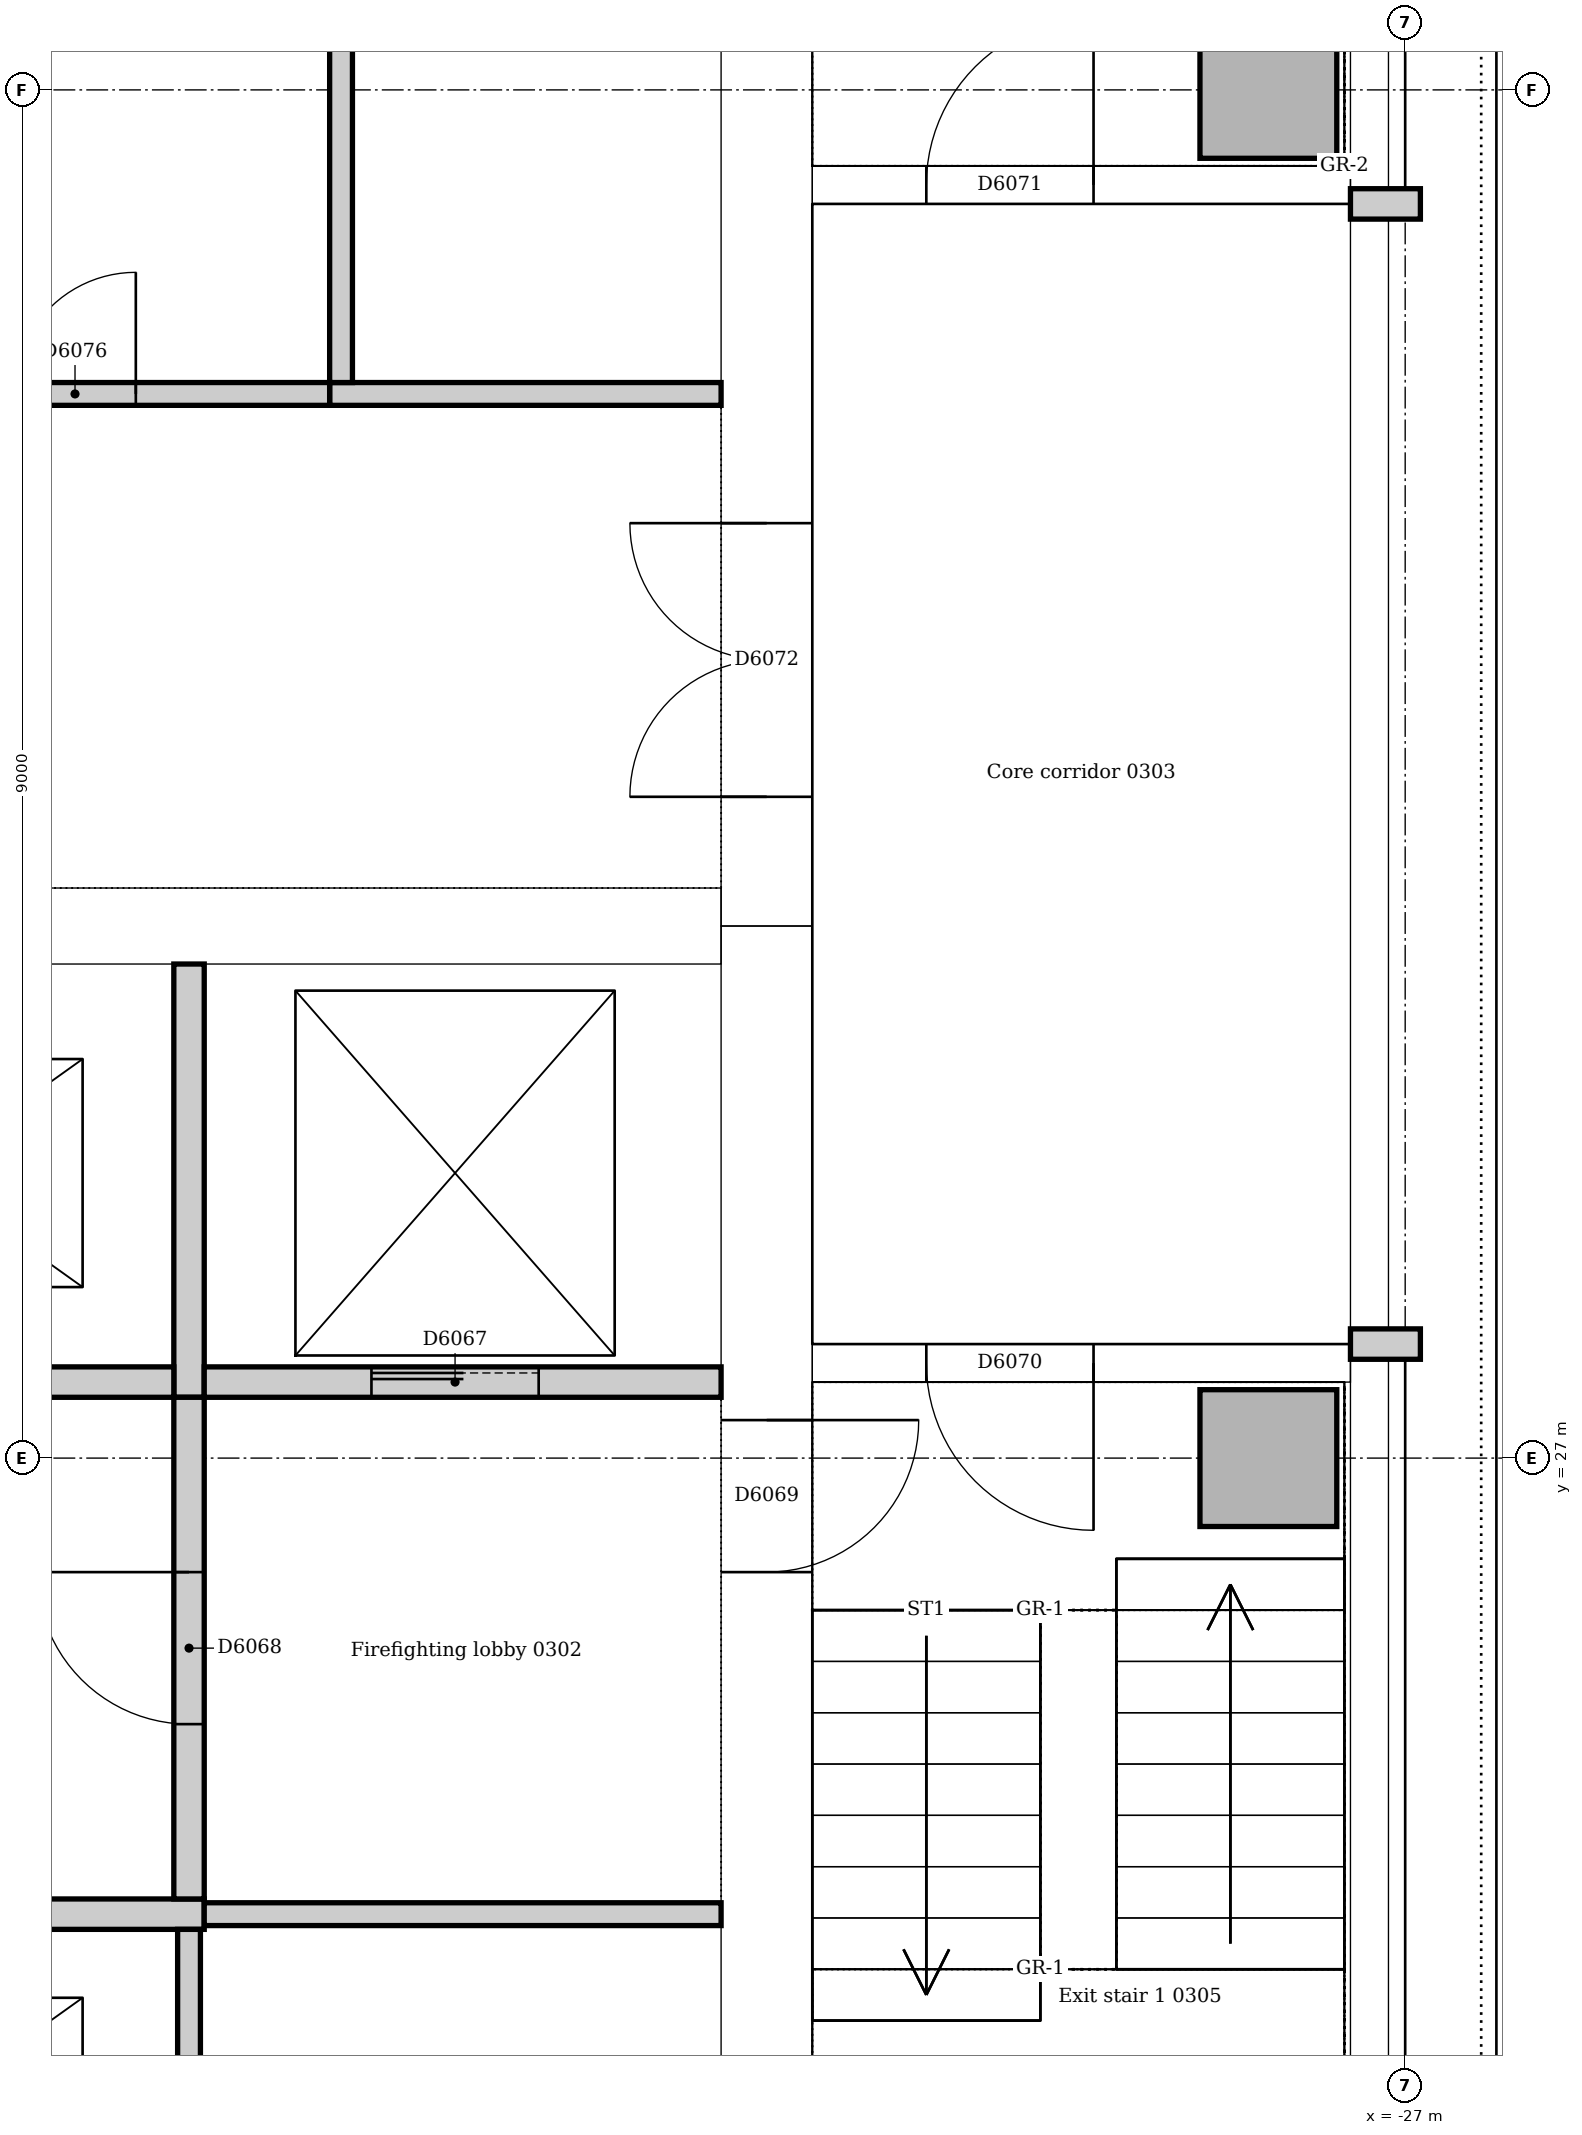
"""IFC4 building model, lengths in metres.
Left out: names, types, materials, properties, quantities, classifications, styles, units other than length and angle.
Written with IfcOpenShell. Run it as: python <this file> out.ifc"""

import sys

from ifc_helpers import new_model, si_unit, direction, frame, frame_2d, origin, origin_2d, place, context, subcontext, project, spatial, rectangle, extrude, element, fill, save


model = new_model("IFC4")
c1 = context("Model", 3, precision=1e-05, world=origin(), true_north=direction((0.0, 1.0)))
c2 = subcontext(c1, "Body", "Model", "MODEL_VIEW")
j1 = project(units=[si_unit("LENGTHUNIT", "METRE"), si_unit("PLANEANGLEUNIT", "RADIAN")], contexts=[c1])
p1 = place(None, origin())
s1 = spatial("IfcSite", under=j1, at=p1, CompositionType="ELEMENT")
p2 = place(p1, origin())
s2 = spatial("IfcBuilding", under=s1, at=p2, CompositionType="ELEMENT")
p3 = place(p2, frame((0.0, 0.0, 16.0)))
s3 = spatial("IfcBuildingStorey", under=s2, at=p3, CompositionType="ELEMENT", Elevation=16.0)
p4 = place(p3, frame((-31.2, 21.0, 0.0), z_axis=(0.0, 0.0, 1.0), x_axis=(0.0, 1.0, 0.0)))
e1 = element("IfcWall", 1, at=p4, inside=s3, PredefinedType="SOLIDWALL", context=c2, shape_type="SweptSolid", body=[
    extrude(rectangle(XDim=9.5, YDim=0.6, at=frame_2d((4.75, 0.0))), origin(), (0.0, 0.0, 1.0), 5.0),
])
p5 = place(p4, frame((5.25, 0.0, 0.0)))
e2 = element("IfcOpeningElement", 2, at=p5, cuts=e1, PredefinedType="OPENING", context=c2, shape_type="SweptSolid", body=[
    extrude(rectangle(XDim=1.0, YDim=2.1, at=frame_2d((0.5, 1.05))), frame((0.0, 0.31, 0.0), z_axis=(0.0, -1.0, 0.0), x_axis=(1.0, 0.0, 0.0)), (0.0, 0.0, 1.0), 0.62),
])
p6 = place(p3, frame((-31.2, 30.5, 0.0), z_axis=(0.0, 0.0, 1.0), x_axis=(0.0, 1.0, 0.0)))
e3 = element("IfcWall", 3, at=p6, inside=s3, PredefinedType="SOLIDWALL", context=c2, shape_type="SweptSolid", body=[
    extrude(rectangle(XDim=11.5, YDim=0.6, at=frame_2d((5.75, 0.0))), origin(), (0.0, 0.0, 1.0), 5.0),
])
p7 = place(p6, frame((0.85, 0.0, 0.0)))
e4 = element("IfcOpeningElement", 4, at=p7, cuts=e3, PredefinedType="OPENING", context=c2, shape_type="SweptSolid", body=[
    extrude(rectangle(XDim=1.8, YDim=2.1, at=frame_2d((0.9, 1.05))), frame((0.0, 0.31, 0.0), z_axis=(0.0, -1.0, 0.0), x_axis=(1.0, 0.0, 0.0)), (0.0, 0.0, 1.0), 0.62),
])
p8 = place(p3, frame((-42.0, 30.5, 0.0), z_axis=(0.0, 0.0, 1.0), x_axis=(1.0, 0.0, 0.0)))
e5 = element("IfcWall", 5, at=p8, inside=s3, PredefinedType="SOLIDWALL", context=c2, shape_type="SweptSolid", body=[
    extrude(rectangle(XDim=10.5, YDim=0.5, at=frame_2d((5.25, 0.0))), origin(), (0.0, 0.0, 1.0), 5.0),
])
p9 = place(p3, frame((-27.36, 27.625, 0.0), z_axis=(0.0, 0.0, 1.0), x_axis=(-1.0, 0.0, 0.0)))
e6 = element("IfcWall", 6, at=p9, inside=s3, PredefinedType="SOLIDWALL", context=c2, shape_type="SweptSolid", body=[
    extrude(rectangle(XDim=3.54, YDim=0.25, at=frame_2d((1.77, 0.0))), origin(), (0.0, 0.0, 1.0), 5.0),
])
p10 = place(p9, frame((1.69, 0.0, 0.0)))
e7 = element("IfcOpeningElement", 7, at=p10, cuts=e6, PredefinedType="OPENING", context=c2, shape_type="SweptSolid", body=[
    extrude(rectangle(XDim=1.1, YDim=2.1, at=frame_2d((0.55, 1.05))), frame((0.0, 0.135, 0.0), z_axis=(0.0, -1.0, 0.0), x_axis=(1.0, 0.0, 0.0)), (0.0, 0.0, 1.0), 0.27),
])
p11 = place(p3, frame((-30.9, 35.375, 0.0), z_axis=(0.0, 0.0, 1.0), x_axis=(1.0, 0.0, 0.0)))
e8 = element("IfcWall", 8, at=p11, inside=s3, PredefinedType="SOLIDWALL", context=c2, shape_type="SweptSolid", body=[
    extrude(rectangle(XDim=3.54, YDim=0.25, at=frame_2d((1.77, 0.0))), origin(), (0.0, 0.0, 1.0), 5.0),
])
p12 = place(p11, frame((0.75, 0.0, 0.0)))
e9 = element("IfcOpeningElement", 9, at=p12, cuts=e8, PredefinedType="OPENING", context=c2, shape_type="SweptSolid", body=[
    extrude(rectangle(XDim=1.1, YDim=2.1, at=frame_2d((0.55, 1.05))), frame((0.0, 0.135, 0.0), z_axis=(0.0, -1.0, 0.0), x_axis=(1.0, 0.0, 0.0)), (0.0, 0.0, 1.0), 0.27),
])
p13 = place(p3, frame((-27.235, 21.0, 0.0), z_axis=(0.0, 0.0, 1.0), x_axis=(0.0, 1.0, 0.0)))
e10 = element("IfcWall", 10, at=p13, inside=s3, PredefinedType="SOLIDWALL", context=c2, shape_type="SweptSolid", body=[
    extrude(rectangle(XDim=6.65, YDim=0.25, at=frame_2d((3.325, 0.0))), origin(), (0.0, 0.0, 1.0), 5.0),
])
p14 = place(p3, frame((-27.235, 27.85, 0.0), z_axis=(0.0, 0.0, 1.0), x_axis=(0.0, 1.0, 0.0)))
e11 = element("IfcWall", 11, at=p14, inside=s3, PredefinedType="SOLIDWALL", context=c2, shape_type="SweptSolid", body=[
    extrude(rectangle(XDim=7.3, YDim=0.25, at=frame_2d((3.65, 0.0))), origin(), (0.0, 0.0, 1.0), 5.0),
])
p15 = place(p3, frame((-27.235, 35.35, 0.0), z_axis=(0.0, 0.0, 1.0), x_axis=(0.0, 1.0, 0.0)))
e12 = element("IfcWall", 12, at=p15, inside=s3, PredefinedType="SOLIDWALL", context=c2, shape_type="SweptSolid", body=[
    extrude(rectangle(XDim=6.65, YDim=0.25, at=frame_2d((3.325, 0.0))), origin(), (0.0, 0.0, 1.0), 5.0),
])
for number, where, z_axis, x_axis in (
    (13, (-27.9, 27.0, 0.0), (0.0, 0.0, 1.0), (1.0, 0.0, 0.0)),
    (14, (-27.9, 36.0, 0.0), (0.0, 0.0, 1.0), (1.0, 0.0, 0.0)),
):
    element("IfcColumn", number, at=place(p3, frame(where, z_axis=z_axis, x_axis=x_axis)), inside=s3, PredefinedType="COLUMN", context=c2, shape_type="SweptSolid", body=[
        extrude(rectangle(XDim=0.9, YDim=0.9, at=origin_2d()), origin(), (0.0, 0.0, 1.0), 5.0),
    ])
p16 = place(p3, frame((-34.9, 24.0, 0.0), z_axis=(0.0, 0.0, 1.0), x_axis=(-1.0, 0.0, 0.0)))
e15 = element("IfcWall", 15, at=p16, inside=s3, PredefinedType="SOLIDWALL", context=c2, shape_type="SweptSolid", body=[
    extrude(rectangle(XDim=3.5, YDim=0.2, at=frame_2d((1.75, 0.0))), origin(), (0.0, 0.0, 1.0), 5.0),
])
p17 = place(p16, frame((1.3, 0.0, 0.0)))
e16 = element("IfcOpeningElement", 16, at=p17, cuts=e15, PredefinedType="OPENING", context=c2, shape_type="SweptSolid", body=[
    extrude(rectangle(XDim=1.1, YDim=2.1, at=frame_2d((0.55, 1.05))), frame((0.0, 0.11, 0.0), z_axis=(0.0, -1.0, 0.0), x_axis=(1.0, 0.0, 0.0)), (0.0, 0.0, 1.0), 0.22),
])
p18 = place(p3, frame((-35.0, 27.4, 0.0), z_axis=(0.0, 0.0, 1.0), x_axis=(0.0, 1.0, 0.0)))
e17 = element("IfcWall", 17, at=p18, inside=s3, PredefinedType="SOLIDWALL", context=c2, shape_type="SweptSolid", body=[
    extrude(rectangle(XDim=2.85, YDim=0.2, at=frame_2d((1.425, 0.0))), origin(), (0.0, 0.0, 1.0), 5.0),
])
p19 = place(p3, frame((-38.4, 27.5, 0.0), z_axis=(0.0, 0.0, 1.0), x_axis=(1.0, 0.0, 0.0)))
e18 = element("IfcWall", 18, at=p19, inside=s3, PredefinedType="SOLIDWALL", context=c2, shape_type="SweptSolid", body=[
    extrude(rectangle(XDim=3.3, YDim=0.2, at=frame_2d((1.65, 0.0))), origin(), (0.0, 0.0, 1.0), 5.0),
])
p20 = place(p19, frame((1.1, 0.0, 0.0)))
e19 = element("IfcOpeningElement", 19, at=p20, cuts=e18, PredefinedType="OPENING", context=c2, shape_type="SweptSolid", body=[
    extrude(rectangle(XDim=1.1, YDim=2.1, at=frame_2d((0.55, 1.05))), frame((0.0, 0.11, 0.0), z_axis=(0.0, -1.0, 0.0), x_axis=(1.0, 0.0, 0.0)), (0.0, 0.0, 1.0), 0.22),
])
p21 = place(p3, frame((-34.9, 27.5, 0.0), z_axis=(0.0, 0.0, 1.0), x_axis=(1.0, 0.0, 0.0)))
e20 = element("IfcWall", 20, at=p21, inside=s3, PredefinedType="SOLIDWALL", context=c2, shape_type="SweptSolid", body=[
    extrude(rectangle(XDim=3.4, YDim=0.2, at=frame_2d((1.7, 0.0))), origin(), (0.0, 0.0, 1.0), 5.0),
])
p22 = place(p21, frame((1.1, 0.0, 0.0)))
e21 = element("IfcOpeningElement", 21, at=p22, cuts=e20, PredefinedType="OPENING", context=c2, shape_type="SweptSolid", body=[
    extrude(rectangle(XDim=1.1, YDim=2.1, at=frame_2d((0.55, 1.05))), frame((0.0, 0.11, 0.0), z_axis=(0.0, -1.0, 0.0), x_axis=(1.0, 0.0, 0.0)), (0.0, 0.0, 1.0), 0.22),
])
p23 = place(p3, frame((-35.0, 24.1, 0.0), z_axis=(0.0, 0.0, 1.0), x_axis=(0.0, 1.0, 0.0)))
e22 = element("IfcWall", 22, at=p23, inside=s3, PredefinedType="SOLIDWALL", context=c2, shape_type="SweptSolid", body=[
    extrude(rectangle(XDim=3.3, YDim=0.2, at=frame_2d((1.65, 0.0))), origin(), (0.0, 0.0, 1.0), 5.0),
])
p24 = place(p23, frame((1.15, 0.0, 0.0)))
e23 = element("IfcOpeningElement", 23, at=p24, cuts=e22, PredefinedType="OPENING", context=c2, shape_type="SweptSolid", body=[
    extrude(rectangle(XDim=1.0, YDim=2.1, at=frame_2d((0.5, 1.05))), frame((0.0, 0.11, 0.0), z_axis=(0.0, -1.0, 0.0), x_axis=(1.0, 0.0, 0.0)), (0.0, 0.0, 1.0), 0.22),
])
for number, where, z_axis, x_axis in (
    (24, (-27.36, 27.75, 0.0), (0.0, 0.0, 1.0), (1.0, 0.0, 0.0)),
    (25, (-26.9, 35.25, 0.0), (0.0, 0.0, 1.0), (-1.0, 0.0, 0.0)),
):
    element("IfcWall", number, at=place(p3, frame(where, z_axis=z_axis, x_axis=x_axis)), inside=s3, PredefinedType="SOLIDWALL", context=c2, shape_type="SweptSolid", body=[
        extrude(rectangle(XDim=0.46, YDim=0.2, at=frame_2d((0.23, 0.0))), origin(), (0.0, 0.0, 1.0), 5.0),
    ])
p25 = place(p3, frame((-35.0, 21.0, 0.0), z_axis=(0.0, 0.0, 1.0), x_axis=(0.0, 1.0, 0.0)))
e26 = element("IfcWall", 26, at=p25, inside=s3, PredefinedType="SOLIDWALL", context=c2, shape_type="SweptSolid", body=[
    extrude(rectangle(XDim=2.9, YDim=0.15, at=frame_2d((1.45, 0.0))), origin(), (0.0, 0.0, 1.0), 5.0),
])
p26 = place(p3, frame((-31.5, 24.0, 0.0), z_axis=(0.0, 0.0, 1.0), x_axis=(-1.0, 0.0, 0.0)))
e27 = element("IfcWall", 27, at=p26, inside=s3, PredefinedType="SOLIDWALL", context=c2, shape_type="SweptSolid", body=[
    extrude(rectangle(XDim=3.4, YDim=0.15, at=frame_2d((1.7, 0.0))), origin(), (0.0, 0.0, 1.0), 5.0),
])
p27 = place(p3, frame((-34.075, 34.0, 0.0), z_axis=(0.0, 0.0, 1.0), x_axis=(1.0, 0.0, 0.0)))
e28 = element("IfcWall", 28, at=p27, inside=s3, PredefinedType="SOLIDWALL", context=c2, shape_type="SweptSolid", body=[
    extrude(rectangle(XDim=2.575, YDim=0.15, at=frame_2d((1.288, 0.0))), origin(), (0.0, 0.0, 1.0), 5.0),
])
p28 = place(p3, frame((-34.0, 41.075, 0.0), z_axis=(0.0, 0.0, 1.0), x_axis=(0.0, -1.0, 0.0)))
e29 = element("IfcWall", 29, at=p28, inside=s3, PredefinedType="SOLIDWALL", context=c2, shape_type="SweptSolid", body=[
    extrude(rectangle(XDim=7.0, YDim=0.15, at=frame_2d((3.5, 0.0))), origin(), (0.0, 0.0, 1.0), 5.0),
])
p29 = place(p3, frame((-34.075, 34.0, 0.0), z_axis=(0.0, 0.0, 1.0), x_axis=(-1.0, 0.0, 0.0)))
e30 = element("IfcWall", 30, at=p29, inside=s3, PredefinedType="PARTITIONING", context=c2, shape_type="SweptSolid", body=[
    extrude(rectangle(XDim=3.35, YDim=0.15, at=frame_2d((1.675, 0.0))), origin(), (0.0, 0.0, 1.0), 4.7),
])
p30 = place(p29, frame((1.275, 0.0, 0.0)))
e31 = element("IfcOpeningElement", 31, at=p30, cuts=e30, PredefinedType="OPENING", context=c2, shape_type="SweptSolid", body=[
    extrude(rectangle(XDim=0.8, YDim=2.1, at=frame_2d((0.4, 1.05))), frame((0.0, 0.085, 0.0), z_axis=(0.0, -1.0, 0.0), x_axis=(1.0, 0.0, 0.0)), (0.0, 0.0, 1.0), 0.17),
])
p31 = place(p22, origin())
e32 = element("IfcDoor", 32, at=p31, inside=s3, OperationType="SLIDING_TO_LEFT", PredefinedType="DOOR", context=c2, shape_type="SweptSolid", body=[
    extrude(rectangle(XDim=1.1, YDim=2.1, at=frame_2d((0.55, 1.05))), frame((0.0, 0.025, 0.0), z_axis=(0.0, -1.0, 0.0), x_axis=(1.0, 0.0, 0.0)), (0.0, 0.0, 1.0), 0.05),
])
fill(e21, e32)
p32 = place(p24, origin())
e33 = element("IfcDoor", 33, at=p32, inside=s3, OperationType="SINGLE_SWING_RIGHT", PredefinedType="DOOR", context=c2, shape_type="SweptSolid", body=[
    extrude(rectangle(XDim=1.0, YDim=2.1, at=frame_2d((0.5, 1.05))), frame((0.0, 0.025, 0.0), z_axis=(0.0, -1.0, 0.0), x_axis=(1.0, 0.0, 0.0)), (0.0, 0.0, 1.0), 0.05),
])
fill(e23, e33)
p33 = place(p5, frame((1.0, 0.0, 0.0), z_axis=(0.0, 0.0, 1.0), x_axis=(-1.0, 0.0, 0.0)))
e34 = element("IfcDoor", 34, at=p33, inside=s3, OperationType="SINGLE_SWING_LEFT", PredefinedType="DOOR", context=c2, shape_type="SweptSolid", body=[
    extrude(rectangle(XDim=1.0, YDim=2.1, at=frame_2d((0.5, 1.05))), frame((0.0, 0.025, 0.0), z_axis=(0.0, -1.0, 0.0), x_axis=(1.0, 0.0, 0.0)), (0.0, 0.0, 1.0), 0.05),
])
fill(e2, e34)
p34 = place(p10, origin())
e35 = element("IfcDoor", 35, at=p34, inside=s3, OperationType="SINGLE_SWING_LEFT", PredefinedType="DOOR", context=c2, shape_type="SweptSolid", body=[
    extrude(rectangle(XDim=1.1, YDim=2.1, at=frame_2d((0.55, 1.05))), frame((0.0, 0.025, 0.0), z_axis=(0.0, -1.0, 0.0), x_axis=(1.0, 0.0, 0.0)), (0.0, 0.0, 1.0), 0.05),
])
fill(e7, e35)
p35 = place(p12, origin())
e36 = element("IfcDoor", 36, at=p35, inside=s3, OperationType="SINGLE_SWING_RIGHT", PredefinedType="DOOR", context=c2, shape_type="SweptSolid", body=[
    extrude(rectangle(XDim=1.1, YDim=2.1, at=frame_2d((0.55, 1.05))), frame((0.0, 0.025, 0.0), z_axis=(0.0, -1.0, 0.0), x_axis=(1.0, 0.0, 0.0)), (0.0, 0.0, 1.0), 0.05),
])
fill(e9, e36)
p36 = place(p7, origin())
e37 = element("IfcDoor", 37, at=p36, inside=s3, OperationType="DOUBLE_DOOR_SINGLE_SWING", PredefinedType="DOOR", context=c2, shape_type="SweptSolid", body=[
    extrude(rectangle(XDim=1.8, YDim=2.1, at=frame_2d((0.9, 1.05))), frame((0.0, 0.025, 0.0), z_axis=(0.0, -1.0, 0.0), x_axis=(1.0, 0.0, 0.0)), (0.0, 0.0, 1.0), 0.05),
])
fill(e4, e37)
p37 = place(p30, frame((0.8, 0.0, 0.0), z_axis=(0.0, 0.0, 1.0), x_axis=(-1.0, 0.0, 0.0)))
e38 = element("IfcDoor", 38, at=p37, inside=s3, OperationType="SINGLE_SWING_RIGHT", PredefinedType="DOOR", context=c2, shape_type="SweptSolid", body=[
    extrude(rectangle(XDim=0.8, YDim=2.1, at=frame_2d((0.4, 1.05))), frame((0.0, 0.025, 0.0), z_axis=(0.0, -1.0, 0.0), x_axis=(1.0, 0.0, 0.0)), (0.0, 0.0, 1.0), 0.05),
])
fill(e31, e38)
save(model, sys.argv[1])
